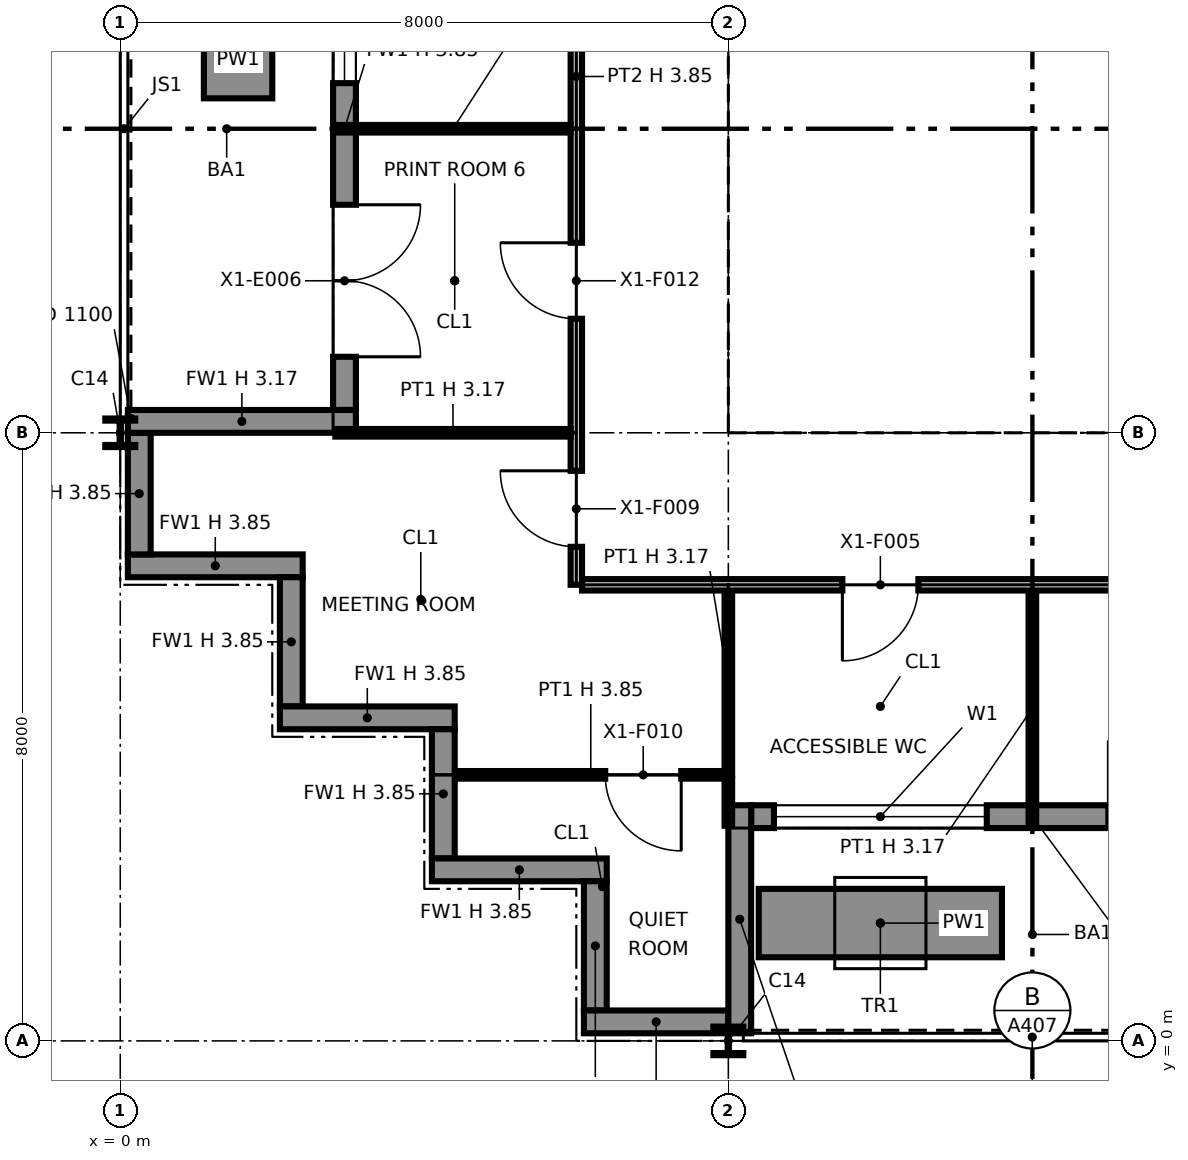
"""IFC4 building model, lengths in metres.
Left out: names, types, materials, properties, quantities, classifications, styles, units other than length and angle.
Written with IfcOpenShell. Run it as: python <this file> out.ifc"""

import sys

from ifc_helpers import new_model, si_unit, direction, frame, frame_2d, origin, origin_2d, place, context, subcontext, project, spatial, polyline, rectangle, i_section, outline, extrude, element, fill, save


model = new_model("IFC4")
c1 = context("Model", 3, precision=1e-05, world=origin(), true_north=direction((0.0, 1.0)))
c2 = subcontext(c1, "Body", "Model", "MODEL_VIEW")
j1 = project(units=[si_unit("LENGTHUNIT", "METRE"), si_unit("PLANEANGLEUNIT", "RADIAN")], contexts=[c1])
p1 = place(None, origin())
s1 = spatial("IfcSite", under=j1, at=p1, CompositionType="ELEMENT")
p2 = place(p1, origin())
s2 = spatial("IfcBuilding", under=s1, at=p2, CompositionType="ELEMENT")
p3 = place(p2, frame((0.0, 0.0, 251.0)))
s3 = spatial("IfcBuildingStorey", under=s2, at=p3, CompositionType="ELEMENT", Elevation=251.0)
for number, where, z_axis, x_axis in (
    (1, (0.0, 8.0, 0.0), (0.0, 0.0, 1.0), (1.0, 0.0, 0.0)),
    (2, (8.0, 0.0, 0.0), (0.0, 0.0, 1.0), (1.0, 0.0, 0.0)),
):
    element("IfcColumn", number, at=place(p3, frame(where, z_axis=z_axis, x_axis=x_axis)), inside=s3, PredefinedType="COLUMN", context=c2, shape_type="SweptSolid", body=[
        extrude(i_section(OverallWidth=0.394, OverallDepth=0.376, WebThickness=0.017, FlangeThickness=0.028, at=origin_2d()), origin(), (0.0, 0.0, 1.0), 3.85),
    ])
p4 = place(p3, frame((8.0, 8.0, 0.0), z_axis=(0.0, 0.0, 1.0), x_axis=(1.0, 0.0, 0.0)))
e3 = element("IfcColumn", 3, at=p4, inside=s3, PredefinedType="COLUMN", context=c2, shape_type="SweptSolid", body=[
    extrude(i_section(OverallWidth=0.371, OverallDepth=0.361, WebThickness=0.012, FlangeThickness=0.02, at=origin_2d()), origin(), (0.0, 0.0, 1.0), 3.85),
])
p5 = place(p3, frame((0.1, 6.25, 0.0), z_axis=(0.0, 0.0, 1.0), x_axis=(1.0, 0.0, 0.0)))
e4 = element("IfcWall", 4, at=p5, inside=s3, PredefinedType="SOLIDWALL", context=c2, shape_type="SweptSolid", body=[
    extrude(rectangle(XDim=2.3, YDim=0.3, at=frame_2d((1.15, 0.0))), origin(), (0.0, 0.0, 1.0), 3.85),
])
p6 = place(p3, frame((2.25, 6.1, 0.0), z_axis=(0.0, 0.0, 1.0), x_axis=(0.0, -1.0, 0.0)))
e5 = element("IfcWall", 5, at=p6, inside=s3, PredefinedType="SOLIDWALL", context=c2, shape_type="SweptSolid", body=[
    extrude(rectangle(XDim=1.7, YDim=0.3, at=frame_2d((0.85, 0.0))), origin(), (0.0, 0.0, 1.0), 3.85),
])
p7 = place(p3, frame((2.1, 4.25, 0.0), z_axis=(0.0, 0.0, 1.0), x_axis=(1.0, 0.0, 0.0)))
e6 = element("IfcWall", 6, at=p7, inside=s3, PredefinedType="SOLIDWALL", context=c2, shape_type="SweptSolid", body=[
    extrude(rectangle(XDim=2.3, YDim=0.3, at=frame_2d((1.15, 0.0))), origin(), (0.0, 0.0, 1.0), 3.85),
])
p8 = place(p3, frame((4.25, 4.1, 0.0), z_axis=(0.0, 0.0, 1.0), x_axis=(0.0, -1.0, 0.0)))
e7 = element("IfcWall", 7, at=p8, inside=s3, PredefinedType="SOLIDWALL", context=c2, shape_type="SweptSolid", body=[
    extrude(rectangle(XDim=1.7, YDim=0.3, at=frame_2d((0.85, 0.0))), origin(), (0.0, 0.0, 1.0), 3.85),
])
p9 = place(p3, frame((4.1, 2.25, 0.0), z_axis=(0.0, 0.0, 1.0), x_axis=(1.0, 0.0, 0.0)))
e8 = element("IfcWall", 8, at=p9, inside=s3, PredefinedType="SOLIDWALL", context=c2, shape_type="SweptSolid", body=[
    extrude(rectangle(XDim=2.3, YDim=0.3, at=frame_2d((1.15, 0.0))), origin(), (0.0, 0.0, 1.0), 3.85),
])
p10 = place(p3, frame((6.25, 2.1, 0.0), z_axis=(0.0, 0.0, 1.0), x_axis=(0.0, -1.0, 0.0)))
e9 = element("IfcWall", 9, at=p10, inside=s3, PredefinedType="SOLIDWALL", context=c2, shape_type="SweptSolid", body=[
    extrude(rectangle(XDim=1.7, YDim=0.3, at=frame_2d((0.85, 0.0))), origin(), (0.0, 0.0, 1.0), 3.85),
])
p11 = place(p3, frame((6.1, 0.25, 0.0), z_axis=(0.0, 0.0, 1.0), x_axis=(1.0, 0.0, 0.0)))
e10 = element("IfcWall", 10, at=p11, inside=s3, PredefinedType="SOLIDWALL", context=c2, shape_type="SweptSolid", body=[
    extrude(rectangle(XDim=1.9, YDim=0.3, at=frame_2d((0.95, 0.0))), origin(), (0.0, 0.0, 1.0), 3.85),
])
p12 = place(p3, frame((8.3, 2.95, 0.0), z_axis=(0.0, 0.0, 1.0), x_axis=(1.0, 0.0, 0.0)))
e11 = element("IfcWall", 11, at=p12, inside=s3, PredefinedType="SOLIDWALL", context=c2, shape_type="SweptSolid", body=[
    extrude(rectangle(XDim=7.4, YDim=0.3, at=frame_2d((3.7, 0.0))), origin(), (0.0, 0.0, 1.0), 3.85),
])
p13 = place(p12, frame((0.3, 0.0, 0.9)))
e12 = element("IfcOpeningElement", 12, at=p13, cuts=e11, PredefinedType="OPENING", context=c2, shape_type="SweptSolid", body=[
    extrude(rectangle(XDim=2.8, YDim=2.2, at=frame_2d((1.4, 1.1))), frame((0.0, 0.16, 0.0), z_axis=(0.0, -1.0, 0.0), x_axis=(1.0, 0.0, 0.0)), (0.0, 0.0, 1.0), 0.32),
])
p14 = place(p12, frame((4.7, 0.0, 0.0)))
e13 = element("IfcOpeningElement", 13, at=p14, cuts=e11, PredefinedType="OPENING", context=c2, shape_type="SweptSolid", body=[
    extrude(rectangle(XDim=2.0, YDim=2.4, at=frame_2d((1.0, 1.2))), frame((0.0, 0.16, 0.0), z_axis=(0.0, -1.0, 0.0), x_axis=(1.0, 0.0, 0.0)), (0.0, 0.0, 1.0), 0.32),
])
p15 = place(p3, frame((8.15, 0.1, 0.0), z_axis=(0.0, 0.0, 1.0), x_axis=(0.0, 1.0, 0.0)))
e14 = element("IfcWall", 14, at=p15, inside=s3, PredefinedType="SOLIDWALL", context=c2, shape_type="SweptSolid", body=[
    extrude(rectangle(XDim=3.0, YDim=0.3, at=frame_2d((1.5, 0.0))), origin(), (0.0, 0.0, 1.0), 3.171),
])
p16 = place(p3, frame((8.4, 1.55, 0.0), z_axis=(0.0, 0.0, 1.0), x_axis=(1.0, 0.0, 0.0)))
e15 = element("IfcWall", 15, at=p16, inside=s3, PredefinedType="SOLIDWALL", context=c2, shape_type="SweptSolid", body=[
    extrude(rectangle(XDim=3.2, YDim=0.9, at=frame_2d((1.6, 0.0))), origin(), (0.0, 0.0, 1.0), 0.6),
])
p17 = place(p3, frame((2.95, 15.7, 0.0), z_axis=(0.0, 0.0, 1.0), x_axis=(0.0, -1.0, 0.0)))
e16 = element("IfcWall", 16, at=p17, inside=s3, PredefinedType="SOLIDWALL", context=c2, shape_type="SweptSolid", body=[
    extrude(rectangle(XDim=7.4, YDim=0.3, at=frame_2d((3.7, 0.0))), origin(), (0.0, 0.0, 1.0), 3.85),
])
p18 = place(p17, frame((0.3, 0.0, 0.9)))
e17 = element("IfcOpeningElement", 17, at=p18, cuts=e16, PredefinedType="OPENING", context=c2, shape_type="SweptSolid", body=[
    extrude(rectangle(XDim=2.8, YDim=2.2, at=frame_2d((1.4, 1.1))), frame((0.0, 0.16, 0.0), z_axis=(0.0, -1.0, 0.0), x_axis=(1.0, 0.0, 0.0)), (0.0, 0.0, 1.0), 0.32),
])
p19 = place(p17, frame((4.7, 0.0, 0.0)))
e18 = element("IfcOpeningElement", 18, at=p19, cuts=e16, PredefinedType="OPENING", context=c2, shape_type="SweptSolid", body=[
    extrude(rectangle(XDim=2.0, YDim=2.4, at=frame_2d((1.0, 1.2))), frame((0.0, 0.16, 0.0), z_axis=(0.0, -1.0, 0.0), x_axis=(1.0, 0.0, 0.0)), (0.0, 0.0, 1.0), 0.32),
])
p20 = place(p3, frame((0.1, 8.15, 0.0), z_axis=(0.0, 0.0, 1.0), x_axis=(1.0, 0.0, 0.0)))
e19 = element("IfcWall", 19, at=p20, inside=s3, PredefinedType="SOLIDWALL", context=c2, shape_type="SweptSolid", body=[
    extrude(rectangle(XDim=3.0, YDim=0.3, at=frame_2d((1.5, 0.0))), origin(), (0.0, 0.0, 1.0), 3.171),
])
p21 = place(p3, frame((0.25, 8.0, 0.0), z_axis=(0.0, 0.0, 1.0), x_axis=(0.0, -1.0, 0.0)))
e20 = element("IfcWall", 20, at=p21, inside=s3, PredefinedType="SOLIDWALL", context=c2, shape_type="SweptSolid", body=[
    extrude(rectangle(XDim=1.6, YDim=0.3, at=frame_2d((0.8, 0.0))), origin(), (0.0, 0.0, 1.0), 3.85),
])
p22 = place(p3, frame((1.55, 15.6, 0.0), z_axis=(0.0, 0.0, 1.0), x_axis=(0.0, -1.0, 0.0)))
e21 = element("IfcWall", 21, at=p22, inside=s3, PredefinedType="SOLIDWALL", context=c2, shape_type="SweptSolid", body=[
    extrude(rectangle(XDim=3.2, YDim=0.9, at=frame_2d((1.6, 0.0))), origin(), (0.0, 0.0, 1.0), 0.6),
])
p23 = place(p3, frame((8.65, 8.75, 0.0), z_axis=(0.0, 0.0, 1.0), x_axis=(1.0, 0.0, 0.0)))
e22 = element("IfcWall", 22, at=p23, inside=s3, PredefinedType="PARTITIONING", context=c2, shape_type="SweptSolid", body=[
    extrude(outline(polyline([(0.0, 0.0), (14.7, 0.0), (14.7, 3.85), (7.438, 3.85), (7.438, 3.308), (7.262, 3.308), (7.261, 3.85), (0.0, 3.85), (0.0, 0.0)])), frame((0.0, 0.1, 0.0), z_axis=(0.0, -1.0, 0.0), x_axis=(1.0, 0.0, 0.0)), (0.0, 0.0, 1.0), 0.2),
])
p24 = place(p23, frame((1.3, 0.0, 0.0)))
e23 = element("IfcOpeningElement", 23, at=p24, cuts=e22, PredefinedType="OPENING", context=c2, shape_type="SweptSolid", body=[
    extrude(rectangle(XDim=1.4, YDim=2.1, at=frame_2d((0.7, 1.05))), frame((0.0, 0.11, 0.0), z_axis=(0.0, -1.0, 0.0), x_axis=(1.0, 0.0, 0.0)), (0.0, 0.0, 1.0), 0.22),
])
p25 = place(p23, frame((4.6, 0.0, 0.0)))
e24 = element("IfcOpeningElement", 24, at=p25, cuts=e22, PredefinedType="OPENING", context=c2, shape_type="SweptSolid", body=[
    extrude(rectangle(XDim=1.4, YDim=2.1, at=frame_2d((0.7, 1.05))), frame((0.0, 0.11, 0.0), z_axis=(0.0, -1.0, 0.0), x_axis=(1.0, 0.0, 0.0)), (0.0, 0.0, 1.0), 0.22),
])
p26 = place(p23, frame((10.4, 0.0, 0.0)))
e25 = element("IfcOpeningElement", 25, at=p26, cuts=e22, PredefinedType="OPENING", context=c2, shape_type="SweptSolid", body=[
    extrude(rectangle(XDim=1.2, YDim=2.1, at=frame_2d((0.6, 1.05))), frame((0.0, 0.11, 0.0), z_axis=(0.0, -1.0, 0.0), x_axis=(1.0, 0.0, 0.0)), (0.0, 0.0, 1.0), 0.22),
])
p27 = place(p3, frame((8.75, 8.85, 0.0), z_axis=(0.0, 0.0, 1.0), x_axis=(0.0, 1.0, 0.0)))
e26 = element("IfcWall", 26, at=p27, inside=s3, PredefinedType="PARTITIONING", context=c2, shape_type="SweptSolid", body=[
    extrude(outline(polyline([(0.0, 0.0), (14.3, 0.0), (14.3, 3.85), (10.225, 3.85), (10.224, 3.44), (10.076, 3.44), (10.075, 3.85), (7.239, 3.85), (7.238, 3.308), (7.062, 3.308), (7.062, 3.85), (0.0, 3.85), (0.0, 0.0)])), frame((0.0, 0.1, 0.0), z_axis=(0.0, -1.0, 0.0), x_axis=(1.0, 0.0, 0.0)), (0.0, 0.0, 1.0), 0.2),
])
p28 = place(p27, frame((8.3, 0.0, 0.0)))
e27 = element("IfcOpeningElement", 27, at=p28, cuts=e26, PredefinedType="OPENING", context=c2, shape_type="SweptSolid", body=[
    extrude(rectangle(XDim=1.8, YDim=2.1, at=frame_2d((0.9, 1.05))), frame((0.0, 0.11, 0.0), z_axis=(0.0, -1.0, 0.0), x_axis=(1.0, 0.0, 0.0)), (0.0, 0.0, 1.0), 0.22),
])
p29 = place(p3, frame((12.4, 8.85, 0.0), z_axis=(0.0, 0.0, 1.0), x_axis=(0.0, 1.0, 0.0)))
e28 = element("IfcWall", 28, at=p29, inside=s3, PredefinedType="PARTITIONING", context=c2, shape_type="SweptSolid", body=[
    extrude(rectangle(XDim=6.85, YDim=0.2, at=frame_2d((3.425, 0.0))), origin(), (0.0, 0.0, 1.0), 3.85),
])
p30 = place(p3, frame((8.0, 2.83, 0.0), z_axis=(0.0, 0.0, 1.0), x_axis=(0.0, 1.0, 0.0)))
e29 = element("IfcWall", 29, at=p30, inside=s3, PredefinedType="PARTITIONING", context=c2, shape_type="SweptSolid", body=[
    extrude(rectangle(XDim=0.62, YDim=0.1, at=frame_2d((0.31, 0.0))), origin(), (0.0, 0.0, 1.0), 3.172),
])
p31 = place(p3, frame((12.0, 2.83, 0.0), z_axis=(0.0, 0.0, 1.0), x_axis=(0.0, 1.0, 0.0)))
e30 = element("IfcWall", 30, at=p31, inside=s3, PredefinedType="PARTITIONING", context=c2, shape_type="SweptSolid", body=[
    extrude(rectangle(XDim=3.095, YDim=0.1, at=frame_2d((1.547, 0.0))), origin(), (0.0, 0.0, 1.0), 3.172),
])
p32 = place(p3, frame((4.43, 3.5, 0.0), z_axis=(0.0, 0.0, 1.0), x_axis=(1.0, 0.0, 0.0)))
e31 = element("IfcWall", 31, at=p32, inside=s3, PredefinedType="PARTITIONING", context=c2, shape_type="SweptSolid", body=[
    extrude(rectangle(XDim=3.52, YDim=0.1, at=frame_2d((1.76, 0.0))), origin(), (0.0, 0.0, 1.0), 3.85),
])
p33 = place(p32, frame((2.95, 0.0, 0.0), z_axis=(0.0, 0.0, 1.0), x_axis=(-1.0, 0.0, 0.0)))
e32 = element("IfcOpeningElement", 32, at=p33, cuts=e31, PredefinedType="OPENING", context=c2, shape_type="SweptSolid", body=[
    extrude(rectangle(XDim=1.0, YDim=2.1, at=frame_2d((0.5, 1.05))), frame((0.0, 0.06, 0.0), z_axis=(0.0, -1.0, 0.0), x_axis=(1.0, 0.0, 0.0)), (0.0, 0.0, 1.0), 0.12),
])
p34 = place(p3, frame((8.0, 3.5, 0.0), z_axis=(0.0, 0.0, 1.0), x_axis=(0.0, 1.0, 0.0)))
e33 = element("IfcWall", 33, at=p34, inside=s3, PredefinedType="PARTITIONING", context=c2, shape_type="SweptSolid", body=[
    extrude(rectangle(XDim=2.425, YDim=0.1, at=frame_2d((1.212, 0.0))), origin(), (0.0, 0.0, 1.0), 3.172),
])
p35 = place(p3, frame((6.075, 6.0, 0.0), z_axis=(0.0, 0.0, 1.0), x_axis=(1.0, 0.0, 0.0)))
e34 = element("IfcWall", 34, at=p35, inside=s3, PredefinedType="PARTITIONING", context=c2, shape_type="SweptSolid", body=[
    extrude(rectangle(XDim=35.85, YDim=0.15, at=frame_2d((17.925, 0.0))), origin(), (0.0, 0.0, 1.0), 3.85),
])
p36 = place(p35, frame((14.425, 0.0, 0.0), z_axis=(0.0, 0.0, 1.0), x_axis=(-1.0, 0.0, 0.0)))
e35 = element("IfcOpeningElement", 35, at=p36, cuts=e34, PredefinedType="OPENING", context=c2, shape_type="SweptSolid", body=[
    extrude(rectangle(XDim=1.0, YDim=2.1, at=frame_2d((0.5, 1.05))), frame((0.0, 0.085, 0.0), z_axis=(0.0, -1.0, 0.0), x_axis=(1.0, 0.0, 0.0)), (0.0, 0.0, 1.0), 0.17),
])
p37 = place(p35, frame((30.425, 0.0, 0.0), z_axis=(0.0, 0.0, 1.0), x_axis=(-1.0, 0.0, 0.0)))
e36 = element("IfcOpeningElement", 36, at=p37, cuts=e34, PredefinedType="OPENING", context=c2, shape_type="SweptSolid", body=[
    extrude(rectangle(XDim=1.0, YDim=2.1, at=frame_2d((0.5, 1.05))), frame((0.0, 0.085, 0.0), z_axis=(0.0, -1.0, 0.0), x_axis=(1.0, 0.0, 0.0)), (0.0, 0.0, 1.0), 0.17),
])
p38 = place(p35, frame((4.425, 0.0, 0.0), z_axis=(0.0, 0.0, 1.0), x_axis=(-1.0, 0.0, 0.0)))
e37 = element("IfcOpeningElement", 37, at=p38, cuts=e34, PredefinedType="OPENING", context=c2, shape_type="SweptSolid", body=[
    extrude(rectangle(XDim=1.0, YDim=2.1, at=frame_2d((0.5, 1.05))), frame((0.0, 0.085, 0.0), z_axis=(0.0, -1.0, 0.0), x_axis=(1.0, 0.0, 0.0)), (0.0, 0.0, 1.0), 0.17),
])
p39 = place(p35, frame((8.425, 0.0, 0.0), z_axis=(0.0, 0.0, 1.0), x_axis=(-1.0, 0.0, 0.0)))
e38 = element("IfcOpeningElement", 38, at=p39, cuts=e34, PredefinedType="OPENING", context=c2, shape_type="SweptSolid", body=[
    extrude(rectangle(XDim=1.0, YDim=2.1, at=frame_2d((0.5, 1.05))), frame((0.0, 0.085, 0.0), z_axis=(0.0, -1.0, 0.0), x_axis=(1.0, 0.0, 0.0)), (0.0, 0.0, 1.0), 0.17),
])
p40 = place(p35, frame((19.425, 0.0, 0.0), z_axis=(0.0, 0.0, 1.0), x_axis=(-1.0, 0.0, 0.0)))
e39 = element("IfcOpeningElement", 39, at=p40, cuts=e34, PredefinedType="OPENING", context=c2, shape_type="SweptSolid", body=[
    extrude(rectangle(XDim=1.0, YDim=2.1, at=frame_2d((0.5, 1.05))), frame((0.0, 0.085, 0.0), z_axis=(0.0, -1.0, 0.0), x_axis=(1.0, 0.0, 0.0)), (0.0, 0.0, 1.0), 0.17),
])
p41 = place(p35, frame((24.425, 0.0, 0.0), z_axis=(0.0, 0.0, 1.0), x_axis=(-1.0, 0.0, 0.0)))
e40 = element("IfcOpeningElement", 40, at=p41, cuts=e34, PredefinedType="OPENING", context=c2, shape_type="SweptSolid", body=[
    extrude(rectangle(XDim=1.0, YDim=2.1, at=frame_2d((0.5, 1.05))), frame((0.0, 0.085, 0.0), z_axis=(0.0, -1.0, 0.0), x_axis=(1.0, 0.0, 0.0)), (0.0, 0.0, 1.0), 0.17),
])
p42 = place(p35, frame((35.425, 0.0, 0.0), z_axis=(0.0, 0.0, 1.0), x_axis=(-1.0, 0.0, 0.0)))
e41 = element("IfcOpeningElement", 41, at=p42, cuts=e34, PredefinedType="OPENING", context=c2, shape_type="SweptSolid", body=[
    extrude(rectangle(XDim=1.0, YDim=2.1, at=frame_2d((0.5, 1.05))), frame((0.0, 0.085, 0.0), z_axis=(0.0, -1.0, 0.0), x_axis=(1.0, 0.0, 0.0)), (0.0, 0.0, 1.0), 0.17),
])
p43 = place(p3, frame((6.0, 6.0, 0.0), z_axis=(0.0, 0.0, 1.0), x_axis=(0.0, 1.0, 0.0)))
e42 = element("IfcWall", 42, at=p43, inside=s3, PredefinedType="PARTITIONING", context=c2, shape_type="SweptSolid", body=[
    extrude(outline(polyline([(0.0, 0.0), (13.375, 0.0), (13.375, 3.85), (10.3, 3.85), (10.298, 3.172), (9.702, 3.172), (9.7, 3.85), (6.3, 3.85), (6.298, 3.172), (5.702, 3.172), (5.7, 3.85), (2.3, 3.85), (2.298, 3.172), (1.702, 3.172), (1.7, 3.85), (0.0, 3.85), (0.0, 0.0)])), frame((0.0, 0.075, 0.0), z_axis=(0.0, -1.0, 0.0), x_axis=(1.0, 0.0, 0.0)), (0.0, 0.0, 1.0), 0.15),
])
p44 = place(p43, frame((0.5, 0.0, 0.0)))
e43 = element("IfcOpeningElement", 43, at=p44, cuts=e42, PredefinedType="OPENING", context=c2, shape_type="SweptSolid", body=[
    extrude(rectangle(XDim=1.0, YDim=2.1, at=frame_2d((0.5, 1.05))), frame((0.0, 0.085, 0.0), z_axis=(0.0, -1.0, 0.0), x_axis=(1.0, 0.0, 0.0)), (0.0, 0.0, 1.0), 0.17),
])
p45 = place(p43, frame((3.5, 0.0, 0.0)))
e44 = element("IfcOpeningElement", 44, at=p45, cuts=e42, PredefinedType="OPENING", context=c2, shape_type="SweptSolid", body=[
    extrude(rectangle(XDim=1.0, YDim=2.1, at=frame_2d((0.5, 1.05))), frame((0.0, 0.085, 0.0), z_axis=(0.0, -1.0, 0.0), x_axis=(1.0, 0.0, 0.0)), (0.0, 0.0, 1.0), 0.17),
])
p46 = place(p43, frame((7.5, 0.0, 0.0)))
e45 = element("IfcOpeningElement", 45, at=p46, cuts=e42, PredefinedType="OPENING", context=c2, shape_type="SweptSolid", body=[
    extrude(rectangle(XDim=1.0, YDim=2.1, at=frame_2d((0.5, 1.05))), frame((0.0, 0.085, 0.0), z_axis=(0.0, -1.0, 0.0), x_axis=(1.0, 0.0, 0.0)), (0.0, 0.0, 1.0), 0.17),
])
p47 = place(p43, frame((11.225, 0.0, 0.0)))
e46 = element("IfcOpeningElement", 46, at=p47, cuts=e42, PredefinedType="OPENING", context=c2, shape_type="SweptSolid", body=[
    extrude(rectangle(XDim=1.0, YDim=2.1, at=frame_2d((0.5, 1.05))), frame((0.0, 0.085, 0.0), z_axis=(0.0, -1.0, 0.0), x_axis=(1.0, 0.0, 0.0)), (0.0, 0.0, 1.0), 0.17),
])
for number, where, z_axis, x_axis in (
    (47, (2.83, 8.0, 0.0), (0.0, 0.0, 1.0), (1.0, 0.0, 0.0)),
    (48, (2.83, 12.0, 0.0), (0.0, 0.0, 1.0), (1.0, 0.0, 0.0)),
):
    element("IfcWall", number, at=place(p3, frame(where, z_axis=z_axis, x_axis=x_axis)), inside=s3, PredefinedType="PARTITIONING", context=c2, shape_type="SweptSolid", body=[
        extrude(rectangle(XDim=3.095, YDim=0.1, at=frame_2d((1.547, 0.0))), origin(), (0.0, 0.0, 1.0), 3.172),
    ])
p48 = place(p13, origin())
e49 = element("IfcWindow", 49, at=p48, inside=s3, PartitioningType="SINGLE_PANEL", PredefinedType="WINDOW", context=c2, shape_type="SweptSolid", body=[
    extrude(rectangle(XDim=2.8, YDim=2.2, at=frame_2d((1.4, 1.1))), frame((0.0, 0.03, 0.0), z_axis=(0.0, -1.0, 0.0), x_axis=(1.0, 0.0, 0.0)), (0.0, 0.0, 1.0), 0.06),
])
fill(e12, e49)
p49 = place(p18, origin())
e50 = element("IfcWindow", 50, at=p49, inside=s3, PartitioningType="SINGLE_PANEL", PredefinedType="WINDOW", context=c2, shape_type="SweptSolid", body=[
    extrude(rectangle(XDim=2.8, YDim=2.2, at=frame_2d((1.4, 1.1))), frame((0.0, 0.03, 0.0), z_axis=(0.0, -1.0, 0.0), x_axis=(1.0, 0.0, 0.0)), (0.0, 0.0, 1.0), 0.06),
])
fill(e17, e50)
p50 = place(p19, origin())
e51 = element("IfcDoor", 51, at=p50, inside=s3, OperationType="DOUBLE_DOOR_SINGLE_SWING", PredefinedType="DOOR", context=c2, shape_type="SweptSolid", body=[
    extrude(rectangle(XDim=2.0, YDim=2.4, at=frame_2d((1.0, 1.2))), frame((0.0, 0.025, 0.0), z_axis=(0.0, -1.0, 0.0), x_axis=(1.0, 0.0, 0.0)), (0.0, 0.0, 1.0), 0.05),
])
fill(e18, e51)
p51 = place(p24, origin())
e52 = element("IfcDoor", 52, at=p51, inside=s3, OperationType="DOUBLE_DOOR_SINGLE_SWING", PredefinedType="NOTDEFINED", context=c2, shape_type="SweptSolid", body=[
    extrude(rectangle(XDim=1.4, YDim=2.1, at=frame_2d((0.7, 1.05))), frame((0.0, 0.025, 0.0), z_axis=(0.0, -1.0, 0.0), x_axis=(1.0, 0.0, 0.0)), (0.0, 0.0, 1.0), 0.05),
])
fill(e23, e52)
p52 = place(p38, origin())
e53 = element("IfcDoor", 53, at=p52, inside=s3, OperationType="SINGLE_SWING_RIGHT", PredefinedType="DOOR", context=c2, shape_type="SweptSolid", body=[
    extrude(rectangle(XDim=1.0, YDim=2.1, at=frame_2d((0.5, 1.05))), frame((0.0, 0.025, 0.0), z_axis=(0.0, -1.0, 0.0), x_axis=(1.0, 0.0, 0.0)), (0.0, 0.0, 1.0), 0.05),
])
fill(e37, e53)
p53 = place(p44, origin())
e54 = element("IfcDoor", 54, at=p53, inside=s3, OperationType="SINGLE_SWING_RIGHT", PredefinedType="DOOR", context=c2, shape_type="SweptSolid", body=[
    extrude(rectangle(XDim=1.0, YDim=2.1, at=frame_2d((0.5, 1.05))), frame((0.0, 0.025, 0.0), z_axis=(0.0, -1.0, 0.0), x_axis=(1.0, 0.0, 0.0)), (0.0, 0.0, 1.0), 0.05),
])
fill(e43, e54)
p54 = place(p33, origin())
e55 = element("IfcDoor", 55, at=p54, inside=s3, OperationType="SINGLE_SWING_LEFT", PredefinedType="DOOR", context=c2, shape_type="SweptSolid", body=[
    extrude(rectangle(XDim=1.0, YDim=2.1, at=frame_2d((0.5, 1.05))), frame((0.0, 0.025, 0.0), z_axis=(0.0, -1.0, 0.0), x_axis=(1.0, 0.0, 0.0)), (0.0, 0.0, 1.0), 0.05),
])
fill(e32, e55)
p55 = place(p45, origin())
e56 = element("IfcDoor", 56, at=p55, inside=s3, OperationType="SINGLE_SWING_RIGHT", PredefinedType="DOOR", context=c2, shape_type="SweptSolid", body=[
    extrude(rectangle(XDim=1.0, YDim=2.1, at=frame_2d((0.5, 1.05))), frame((0.0, 0.025, 0.0), z_axis=(0.0, -1.0, 0.0), x_axis=(1.0, 0.0, 0.0)), (0.0, 0.0, 1.0), 0.05),
])
fill(e44, e56)
save(model, sys.argv[1])
